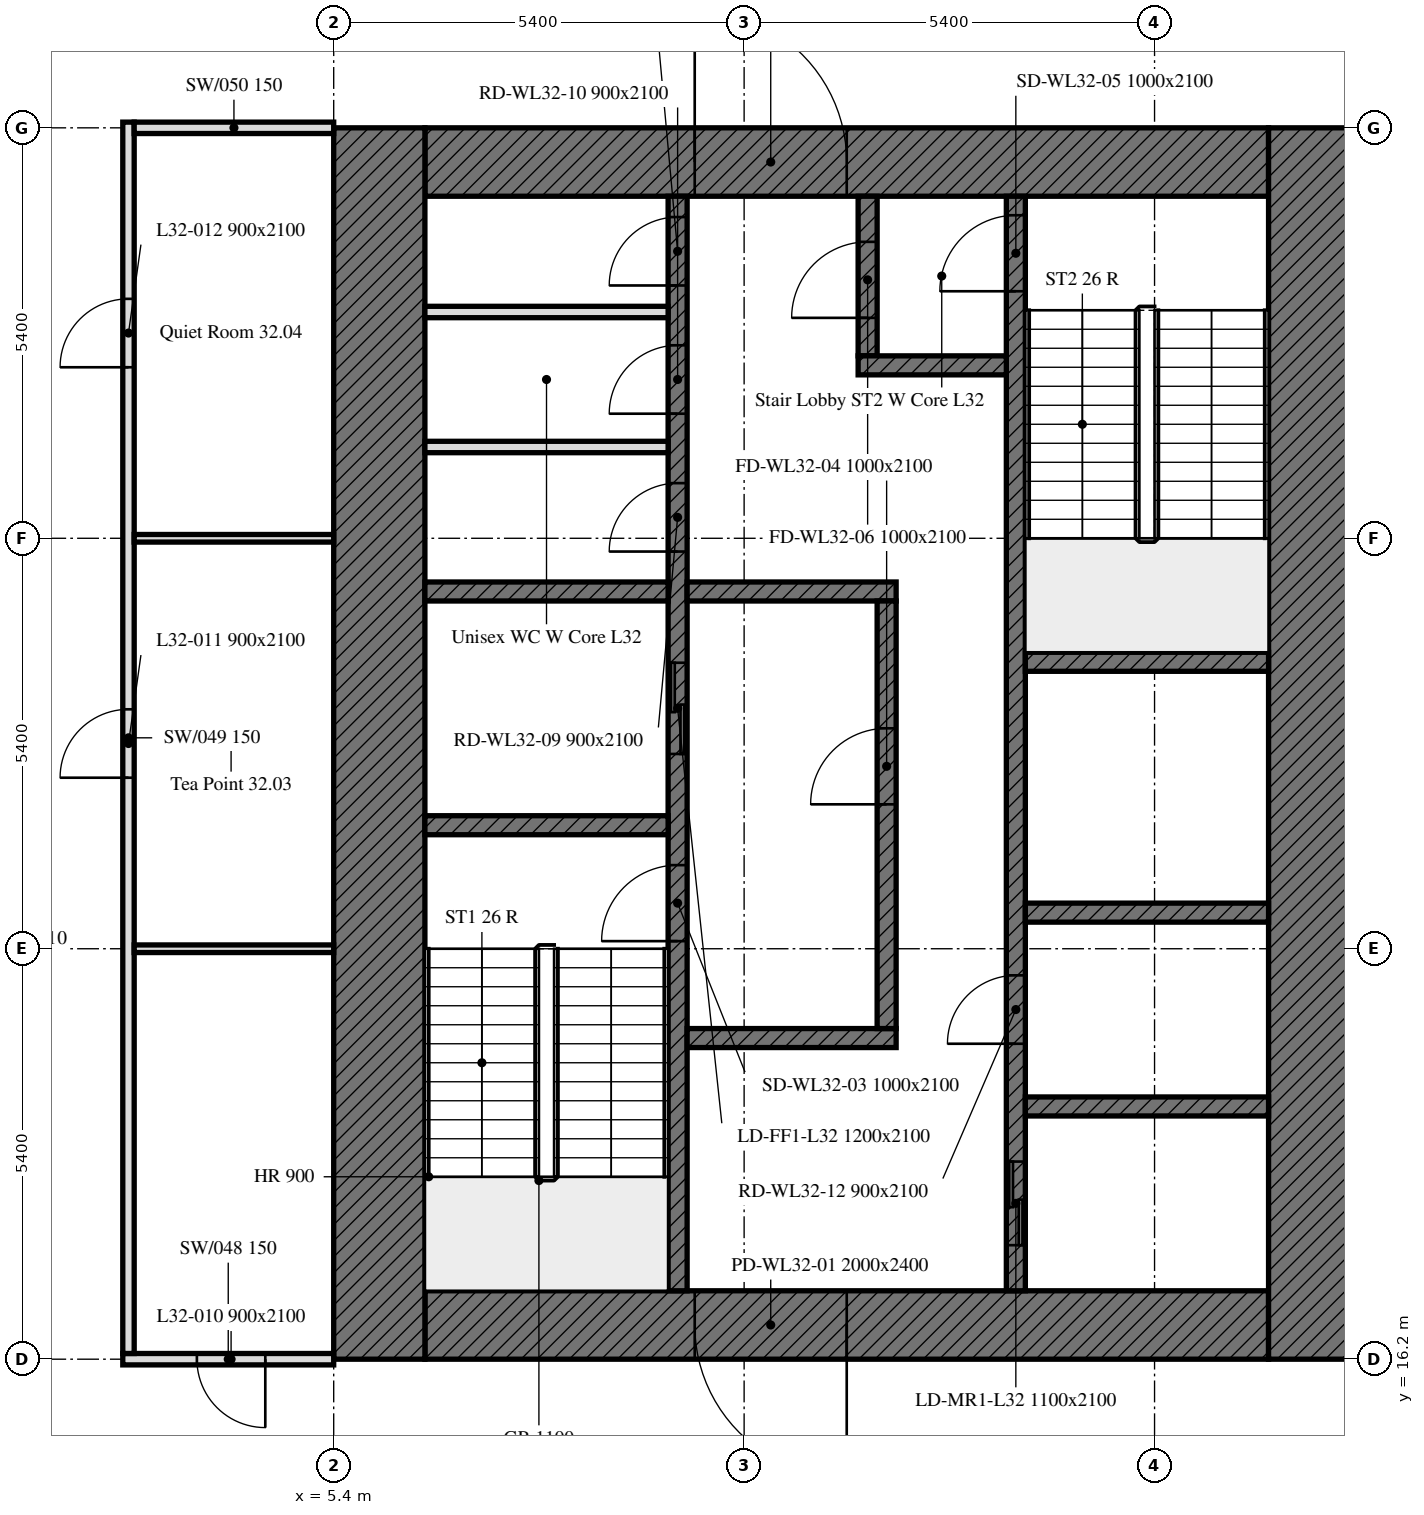
"""IFC4 building model, lengths in metres.
Left out: names, types, materials, properties, quantities, classifications, styles, units other than length and angle.
Written with IfcOpenShell. Run it as: python <this file> out.ifc"""

import sys

from ifc_helpers import new_model, si_unit, direction, frame, frame_2d, origin, place, context, subcontext, project, spatial, rectangle, extrude, element, fill, save


model = new_model("IFC4")
c1 = context("Model", 3, precision=1e-05, world=origin(), true_north=direction((0.0, 1.0)))
c2 = subcontext(c1, "Body", "Model", "MODEL_VIEW")
j1 = project(units=[si_unit("LENGTHUNIT", "METRE"), si_unit("PLANEANGLEUNIT", "RADIAN")], contexts=[c1])
p1 = place(None, origin())
s1 = spatial("IfcSite", under=j1, at=p1, CompositionType="ELEMENT")
p2 = place(p1, origin())
s2 = spatial("IfcBuilding", under=s1, at=p2, CompositionType="ELEMENT")
p3 = place(p2, frame((0.0, 0.0, 138.4)))
s3 = spatial("IfcBuildingStorey", under=s2, at=p3, CompositionType="ELEMENT", Elevation=138.4)
p4 = place(p3, frame((17.7, 16.65, 0.0), z_axis=(0.0, 0.0, 1.0), x_axis=(-1.0, 0.0, 0.0)))
e1 = element("IfcWall", 1, at=p4, inside=s3, PredefinedType="SOLIDWALL", context=c2, shape_type="SweptSolid", body=[
    extrude(rectangle(XDim=11.1, YDim=0.9, at=frame_2d((5.55, 0.0))), origin(), (0.0, 0.0, 1.0), 4.5),
])
p5 = place(p4, frame((5.55, 0.0, 0.0)))
e2 = element("IfcOpeningElement", 2, at=p5, cuts=e1, PredefinedType="OPENING", context=c2, shape_type="SweptSolid", body=[
    extrude(rectangle(XDim=2.0, YDim=2.4, at=frame_2d((1.0, 1.2))), frame((0.0, 0.45, 0.0), z_axis=(0.0, -1.0, 0.0), x_axis=(1.0, 0.0, 0.0)), (0.0, 0.0, 1.0), 0.9),
])
p6 = place(p3, frame((6.6, 31.95, 0.0), z_axis=(0.0, 0.0, 1.0), x_axis=(1.0, 0.0, 0.0)))
e3 = element("IfcWall", 3, at=p6, inside=s3, PredefinedType="SOLIDWALL", context=c2, shape_type="SweptSolid", body=[
    extrude(rectangle(XDim=11.1, YDim=0.9, at=frame_2d((5.55, 0.0))), origin(), (0.0, 0.0, 1.0), 4.5),
])
p7 = place(p6, frame((3.55, 0.0, 0.0)))
e4 = element("IfcOpeningElement", 4, at=p7, cuts=e3, PredefinedType="OPENING", context=c2, shape_type="SweptSolid", body=[
    extrude(rectangle(XDim=2.0, YDim=2.4, at=frame_2d((1.0, 1.2))), frame((0.0, 0.45, 0.0), z_axis=(0.0, -1.0, 0.0), x_axis=(1.0, 0.0, 0.0)), (0.0, 0.0, 1.0), 0.9),
])
for number, where, z_axis, x_axis in (
    (5, (6.0, 16.2, 0.0), (0.0, 0.0, 1.0), (0.0, 1.0, 0.0)),
    (6, (18.3, 32.4, 0.0), (0.0, 0.0, 1.0), (0.0, -1.0, 0.0)),
):
    element("IfcWall", number, at=place(p3, frame(where, z_axis=z_axis, x_axis=x_axis)), inside=s3, PredefinedType="SOLIDWALL", context=c2, shape_type="SweptSolid", body=[
        extrude(rectangle(XDim=16.2, YDim=1.2, at=frame_2d((8.1, 0.0))), origin(), (0.0, 0.0, 1.0), 4.5),
    ])
p8 = place(p3, frame((9.925, 17.1, 0.0), z_axis=(0.0, 0.0, 1.0), x_axis=(0.0, 1.0, 0.0)))
e7 = element("IfcWall", 7, at=p8, inside=s3, PredefinedType="SOLIDWALL", context=c2, shape_type="SweptSolid", body=[
    extrude(rectangle(XDim=14.4, YDim=0.25, at=frame_2d((7.2, 0.0))), origin(), (0.0, 0.0, 1.0), 4.5),
])
p9 = place(p8, frame((4.6, 0.0, 0.0)))
e8 = element("IfcOpeningElement", 8, at=p9, cuts=e7, PredefinedType="OPENING", context=c2, shape_type="SweptSolid", body=[
    extrude(rectangle(XDim=1.0, YDim=2.1, at=frame_2d((0.5, 1.05))), frame((0.0, 0.125, 0.0), z_axis=(0.0, -1.0, 0.0), x_axis=(1.0, 0.0, 0.0)), (0.0, 0.0, 1.0), 0.25),
])
p10 = place(p8, frame((7.062, 0.0, 0.0)))
e9 = element("IfcOpeningElement", 9, at=p10, cuts=e7, PredefinedType="OPENING", context=c2, shape_type="SweptSolid", body=[
    extrude(rectangle(XDim=1.2, YDim=2.1, at=frame_2d((0.6, 1.05))), frame((0.0, 0.125, 0.0), z_axis=(0.0, -1.0, 0.0), x_axis=(1.0, 0.0, 0.0)), (0.0, 0.0, 1.0), 0.25),
])
p11 = place(p8, frame((9.726, 0.0, 0.0)))
e10 = element("IfcOpeningElement", 10, at=p11, cuts=e7, PredefinedType="OPENING", context=c2, shape_type="SweptSolid", body=[
    extrude(rectangle(XDim=0.9, YDim=2.1, at=frame_2d((0.45, 1.05))), frame((0.0, 0.125, 0.0), z_axis=(0.0, -1.0, 0.0), x_axis=(1.0, 0.0, 0.0)), (0.0, 0.0, 1.0), 0.25),
])
p12 = place(p8, frame((11.539, 0.0, 0.0)))
e11 = element("IfcOpeningElement", 11, at=p12, cuts=e7, PredefinedType="OPENING", context=c2, shape_type="SweptSolid", body=[
    extrude(rectangle(XDim=0.9, YDim=2.1, at=frame_2d((0.45, 1.05))), frame((0.0, 0.125, 0.0), z_axis=(0.0, -1.0, 0.0), x_axis=(1.0, 0.0, 0.0)), (0.0, 0.0, 1.0), 0.25),
])
p13 = place(p8, frame((13.226, 0.0, 0.0)))
e12 = element("IfcOpeningElement", 12, at=p13, cuts=e7, PredefinedType="OPENING", context=c2, shape_type="SweptSolid", body=[
    extrude(rectangle(XDim=0.9, YDim=2.1, at=frame_2d((0.45, 1.05))), frame((0.0, 0.125, 0.0), z_axis=(0.0, -1.0, 0.0), x_axis=(1.0, 0.0, 0.0)), (0.0, 0.0, 1.0), 0.25),
])
p14 = place(p3, frame((14.375, 17.1, 0.0), z_axis=(0.0, 0.0, 1.0), x_axis=(0.0, 1.0, 0.0)))
e13 = element("IfcWall", 13, at=p14, inside=s3, PredefinedType="SOLIDWALL", context=c2, shape_type="SweptSolid", body=[
    extrude(rectangle(XDim=14.4, YDim=0.25, at=frame_2d((7.2, 0.0))), origin(), (0.0, 0.0, 1.0), 4.5),
])
p15 = place(p14, frame((13.15, 0.0, 0.0)))
e14 = element("IfcOpeningElement", 14, at=p15, cuts=e13, PredefinedType="OPENING", context=c2, shape_type="SweptSolid", body=[
    extrude(rectangle(XDim=1.0, YDim=2.1, at=frame_2d((0.5, 1.05))), frame((0.0, 0.125, 0.0), z_axis=(0.0, -1.0, 0.0), x_axis=(1.0, 0.0, 0.0)), (0.0, 0.0, 1.0), 0.25),
])
p16 = place(p14, frame((0.6, 0.0, 0.0)))
e15 = element("IfcOpeningElement", 15, at=p16, cuts=e13, PredefinedType="OPENING", context=c2, shape_type="SweptSolid", body=[
    extrude(rectangle(XDim=1.1, YDim=2.1, at=frame_2d((0.55, 1.05))), frame((0.0, 0.125, 0.0), z_axis=(0.0, -1.0, 0.0), x_axis=(1.0, 0.0, 0.0)), (0.0, 0.0, 1.0), 0.25),
])
p17 = place(p14, frame((3.25, 0.0, 0.0)))
e16 = element("IfcOpeningElement", 16, at=p17, cuts=e13, PredefinedType="OPENING", context=c2, shape_type="SweptSolid", body=[
    extrude(rectangle(XDim=0.9, YDim=2.1, at=frame_2d((0.45, 1.05))), frame((0.0, 0.125, 0.0), z_axis=(0.0, -1.0, 0.0), x_axis=(1.0, 0.0, 0.0)), (0.0, 0.0, 1.0), 0.25),
])
for number, where, z_axis, x_axis in (
    (17, (6.6, 23.225, 0.0), (0.0, 0.0, 1.0), (1.0, 0.0, 0.0)),
    (18, (14.5, 25.375, 0.0), (0.0, 0.0, 1.0), (1.0, 0.0, 0.0)),
    (19, (14.5, 22.075, 0.0), (0.0, 0.0, 1.0), (1.0, 0.0, 0.0)),
    (20, (6.6, 26.3, 0.0), (0.0, 0.0, 1.0), (1.0, 0.0, 0.0)),
):
    element("IfcWall", number, at=place(p3, frame(where, z_axis=z_axis, x_axis=x_axis)), inside=s3, PredefinedType="SOLIDWALL", context=c2, shape_type="SweptSolid", body=[
        extrude(rectangle(XDim=3.2, YDim=0.25, at=frame_2d((1.6, 0.0))), origin(), (0.0, 0.0, 1.0), 4.5),
    ])
for number, where, z_axis, x_axis in (
    (21, (10.05, 26.3, 0.0), (0.0, 0.0, 1.0), (1.0, 0.0, 0.0)),
    (22, (10.05, 20.425, 0.0), (0.0, 0.0, 1.0), (1.0, 0.0, 0.0)),
):
    element("IfcWall", number, at=place(p3, frame(where, z_axis=z_axis, x_axis=x_axis)), inside=s3, PredefinedType="SOLIDWALL", context=c2, shape_type="SweptSolid", body=[
        extrude(rectangle(XDim=2.75, YDim=0.25, at=frame_2d((1.375, 0.0))), origin(), (0.0, 0.0, 1.0), 4.5),
    ])
p18 = place(p3, frame((12.425, 29.4, 0.0), z_axis=(0.0, 0.0, 1.0), x_axis=(0.0, 1.0, 0.0)))
e23 = element("IfcWall", 23, at=p18, inside=s3, PredefinedType="SOLIDWALL", context=c2, shape_type="SweptSolid", body=[
    extrude(rectangle(XDim=2.1, YDim=0.25, at=frame_2d((1.05, 0.0))), origin(), (0.0, 0.0, 1.0), 4.5),
])
p19 = place(p18, frame((0.5, 0.0, 0.0)))
e24 = element("IfcOpeningElement", 24, at=p19, cuts=e23, PredefinedType="OPENING", context=c2, shape_type="SweptSolid", body=[
    extrude(rectangle(XDim=1.0, YDim=2.1, at=frame_2d((0.5, 1.05))), frame((0.0, 0.125, 0.0), z_axis=(0.0, -1.0, 0.0), x_axis=(1.0, 0.0, 0.0)), (0.0, 0.0, 1.0), 0.25),
])
p20 = place(p3, frame((12.3, 29.275, 0.0), z_axis=(0.0, 0.0, 1.0), x_axis=(1.0, 0.0, 0.0)))
e25 = element("IfcWall", 25, at=p20, inside=s3, PredefinedType="SOLIDWALL", context=c2, shape_type="SweptSolid", body=[
    extrude(rectangle(XDim=1.95, YDim=0.25, at=frame_2d((0.975, 0.0))), origin(), (0.0, 0.0, 1.0), 4.5),
])
p21 = place(p3, frame((12.675, 20.55, 0.0), z_axis=(0.0, 0.0, 1.0), x_axis=(0.0, 1.0, 0.0)))
e26 = element("IfcWall", 26, at=p21, inside=s3, PredefinedType="SOLIDWALL", context=c2, shape_type="SweptSolid", body=[
    extrude(rectangle(XDim=5.625, YDim=0.25, at=frame_2d((2.812, 0.0))), origin(), (0.0, 0.0, 1.0), 4.5),
])
p22 = place(p21, frame((2.95, 0.0, 0.0)))
e27 = element("IfcOpeningElement", 27, at=p22, cuts=e26, PredefinedType="OPENING", context=c2, shape_type="SweptSolid", body=[
    extrude(rectangle(XDim=1.0, YDim=2.1, at=frame_2d((0.5, 1.05))), frame((0.0, 0.125, 0.0), z_axis=(0.0, -1.0, 0.0), x_axis=(1.0, 0.0, 0.0)), (0.0, 0.0, 1.0), 0.25),
])
p23 = place(p3, frame((14.5, 19.525, 0.0), z_axis=(0.0, 0.0, 1.0), x_axis=(1.0, 0.0, 0.0)))
e28 = element("IfcWall", 28, at=p23, inside=s3, PredefinedType="SOLIDWALL", context=c2, shape_type="SweptSolid", body=[
    extrude(rectangle(XDim=3.2, YDim=0.25, at=frame_2d((1.6, 0.0))), origin(), (0.0, 0.0, 1.0), 4.5),
])
for number, where, z_axis, x_axis in (
    (29, (6.6, 28.201, 0.0), (0.0, 0.0, 1.0), (1.0, 0.0, 0.0)),
    (30, (6.6, 29.977, 0.0), (0.0, 0.0, 1.0), (1.0, 0.0, 0.0)),
):
    element("IfcWall", number, at=place(p3, frame(where, z_axis=z_axis, x_axis=x_axis)), inside=s3, PredefinedType="PARTITIONING", context=c2, shape_type="SweptSolid", body=[
        extrude(rectangle(XDim=3.2, YDim=0.15, at=frame_2d((1.6, 0.0))), origin(), (0.0, 0.0, 1.0), 4.5),
    ])
p24 = place(p3, frame((5.4, 16.2, 0.0), z_axis=(0.0, 0.0, 1.0), x_axis=(-1.0, 0.0, 0.0)))
e31 = element("IfcWall", 31, at=p24, inside=s3, PredefinedType="PARTITIONING", context=c2, shape_type="SweptSolid", body=[
    extrude(rectangle(XDim=2.775, YDim=0.15, at=frame_2d((1.387, 0.0))), origin(), (0.0, 0.0, 1.0), 3.75),
])
p25 = place(p24, frame((0.9, 0.0, 0.0)))
e32 = element("IfcOpeningElement", 32, at=p25, cuts=e31, PredefinedType="OPENING", context=c2, shape_type="SweptSolid", body=[
    extrude(rectangle(XDim=0.9, YDim=2.1, at=frame_2d((0.45, 1.05))), frame((0.0, 0.075, 0.0), z_axis=(0.0, -1.0, 0.0), x_axis=(1.0, 0.0, 0.0)), (0.0, 0.0, 1.0), 0.15),
])
p26 = place(p3, frame((2.7, 16.275, 0.0), z_axis=(0.0, 0.0, 1.0), x_axis=(0.0, 1.0, 0.0)))
e33 = element("IfcWall", 33, at=p26, inside=s3, PredefinedType="PARTITIONING", context=c2, shape_type="SweptSolid", body=[
    extrude(rectangle(XDim=16.2, YDim=0.15, at=frame_2d((8.1, 0.0))), origin(), (0.0, 0.0, 1.0), 3.75),
])
p27 = place(p26, frame((7.575, 0.0, 0.0)))
e34 = element("IfcOpeningElement", 34, at=p27, cuts=e33, PredefinedType="OPENING", context=c2, shape_type="SweptSolid", body=[
    extrude(rectangle(XDim=0.9, YDim=2.1, at=frame_2d((0.45, 1.05))), frame((0.0, 0.075, 0.0), z_axis=(0.0, -1.0, 0.0), x_axis=(1.0, 0.0, 0.0)), (0.0, 0.0, 1.0), 0.15),
])
p28 = place(p26, frame((12.975, 0.0, 0.0)))
e35 = element("IfcOpeningElement", 35, at=p28, cuts=e33, PredefinedType="OPENING", context=c2, shape_type="SweptSolid", body=[
    extrude(rectangle(XDim=0.9, YDim=2.1, at=frame_2d((0.45, 1.05))), frame((0.0, 0.075, 0.0), z_axis=(0.0, -1.0, 0.0), x_axis=(1.0, 0.0, 0.0)), (0.0, 0.0, 1.0), 0.15),
])
p29 = place(p3, frame((2.775, 32.4, 0.0), z_axis=(0.0, 0.0, 1.0), x_axis=(1.0, 0.0, 0.0)))
e36 = element("IfcWall", 36, at=p29, inside=s3, PredefinedType="PARTITIONING", context=c2, shape_type="SweptSolid", body=[
    extrude(rectangle(XDim=2.625, YDim=0.15, at=frame_2d((1.312, 0.0))), origin(), (0.0, 0.0, 1.0), 3.75),
])
for number, where, z_axis, x_axis in (
    (37, (5.4, 21.6, 0.0), (0.0, 0.0, 1.0), (-1.0, 0.0, 0.0)),
    (38, (5.4, 27.0, 0.0), (0.0, 0.0, 1.0), (-1.0, 0.0, 0.0)),
):
    element("IfcWall", number, at=place(p3, frame(where, z_axis=z_axis, x_axis=x_axis)), inside=s3, PredefinedType="PARTITIONING", context=c2, shape_type="SweptSolid", body=[
        extrude(rectangle(XDim=2.625, YDim=0.1, at=frame_2d((1.312, 0.0))), origin(), (0.0, 0.0, 1.0), 3.75),
    ])
p30 = place(p5, origin())
e39 = element("IfcDoor", 39, at=p30, inside=s3, OperationType="DOUBLE_DOOR_SINGLE_SWING", PredefinedType="DOOR", context=c2, shape_type="SweptSolid", body=[
    extrude(rectangle(XDim=2.0, YDim=2.4, at=frame_2d((1.0, 1.2))), frame((0.0, 0.025, 0.0), z_axis=(0.0, -1.0, 0.0), x_axis=(1.0, 0.0, 0.0)), (0.0, 0.0, 1.0), 0.05),
])
fill(e2, e39)
p31 = place(p7, origin())
e40 = element("IfcDoor", 40, at=p31, inside=s3, OperationType="DOUBLE_DOOR_SINGLE_SWING", PredefinedType="DOOR", context=c2, shape_type="SweptSolid", body=[
    extrude(rectangle(XDim=2.0, YDim=2.4, at=frame_2d((1.0, 1.2))), frame((0.0, 0.025, 0.0), z_axis=(0.0, -1.0, 0.0), x_axis=(1.0, 0.0, 0.0)), (0.0, 0.0, 1.0), 0.05),
])
fill(e4, e40)
p32 = place(p9, origin())
e41 = element("IfcDoor", 41, at=p32, inside=s3, OperationType="SINGLE_SWING_LEFT", PredefinedType="DOOR", context=c2, shape_type="SweptSolid", body=[
    extrude(rectangle(XDim=1.0, YDim=2.1, at=frame_2d((0.5, 1.05))), frame((0.0, 0.025, 0.0), z_axis=(0.0, -1.0, 0.0), x_axis=(1.0, 0.0, 0.0)), (0.0, 0.0, 1.0), 0.05),
])
fill(e8, e41)
p33 = place(p22, origin())
e42 = element("IfcDoor", 42, at=p33, inside=s3, OperationType="SINGLE_SWING_LEFT", PredefinedType="DOOR", context=c2, shape_type="SweptSolid", body=[
    extrude(rectangle(XDim=1.0, YDim=2.1, at=frame_2d((0.5, 1.05))), frame((0.0, 0.025, 0.0), z_axis=(0.0, -1.0, 0.0), x_axis=(1.0, 0.0, 0.0)), (0.0, 0.0, 1.0), 0.05),
])
fill(e27, e42)
p34 = place(p15, origin())
e43 = element("IfcDoor", 43, at=p34, inside=s3, OperationType="SINGLE_SWING_LEFT", PredefinedType="DOOR", context=c2, shape_type="SweptSolid", body=[
    extrude(rectangle(XDim=1.0, YDim=2.1, at=frame_2d((0.5, 1.05))), frame((0.0, 0.025, 0.0), z_axis=(0.0, -1.0, 0.0), x_axis=(1.0, 0.0, 0.0)), (0.0, 0.0, 1.0), 0.05),
])
fill(e14, e43)
p35 = place(p19, origin())
e44 = element("IfcDoor", 44, at=p35, inside=s3, OperationType="SINGLE_SWING_LEFT", PredefinedType="DOOR", context=c2, shape_type="SweptSolid", body=[
    extrude(rectangle(XDim=1.0, YDim=2.1, at=frame_2d((0.5, 1.05))), frame((0.0, 0.025, 0.0), z_axis=(0.0, -1.0, 0.0), x_axis=(1.0, 0.0, 0.0)), (0.0, 0.0, 1.0), 0.05),
])
fill(e24, e44)
p36 = place(p10, origin())
e45 = element("IfcDoor", 45, at=p36, inside=s3, OperationType="DOUBLE_DOOR_SLIDING", PredefinedType="DOOR", context=c2, shape_type="SweptSolid", body=[
    extrude(rectangle(XDim=1.2, YDim=2.1, at=frame_2d((0.6, 1.05))), frame((0.0, 0.025, 0.0), z_axis=(0.0, -1.0, 0.0), x_axis=(1.0, 0.0, 0.0)), (0.0, 0.0, 1.0), 0.05),
])
fill(e9, e45)
p37 = place(p16, origin())
e46 = element("IfcDoor", 46, at=p37, inside=s3, OperationType="DOUBLE_DOOR_SLIDING", PredefinedType="DOOR", context=c2, shape_type="SweptSolid", body=[
    extrude(rectangle(XDim=1.1, YDim=2.1, at=frame_2d((0.55, 1.05))), frame((0.0, 0.025, 0.0), z_axis=(0.0, -1.0, 0.0), x_axis=(1.0, 0.0, 0.0)), (0.0, 0.0, 1.0), 0.05),
])
fill(e15, e46)
p38 = place(p11, origin())
e47 = element("IfcDoor", 47, at=p38, inside=s3, OperationType="SINGLE_SWING_LEFT", PredefinedType="DOOR", context=c2, shape_type="SweptSolid", body=[
    extrude(rectangle(XDim=0.9, YDim=2.1, at=frame_2d((0.45, 1.05))), frame((0.0, 0.025, 0.0), z_axis=(0.0, -1.0, 0.0), x_axis=(1.0, 0.0, 0.0)), (0.0, 0.0, 1.0), 0.05),
])
fill(e10, e47)
p39 = place(p12, origin())
e48 = element("IfcDoor", 48, at=p39, inside=s3, OperationType="SINGLE_SWING_LEFT", PredefinedType="DOOR", context=c2, shape_type="SweptSolid", body=[
    extrude(rectangle(XDim=0.9, YDim=2.1, at=frame_2d((0.45, 1.05))), frame((0.0, 0.025, 0.0), z_axis=(0.0, -1.0, 0.0), x_axis=(1.0, 0.0, 0.0)), (0.0, 0.0, 1.0), 0.05),
])
fill(e11, e48)
p40 = place(p13, origin())
e49 = element("IfcDoor", 49, at=p40, inside=s3, OperationType="SINGLE_SWING_LEFT", PredefinedType="DOOR", context=c2, shape_type="SweptSolid", body=[
    extrude(rectangle(XDim=0.9, YDim=2.1, at=frame_2d((0.45, 1.05))), frame((0.0, 0.025, 0.0), z_axis=(0.0, -1.0, 0.0), x_axis=(1.0, 0.0, 0.0)), (0.0, 0.0, 1.0), 0.05),
])
fill(e12, e49)
p41 = place(p17, origin())
e50 = element("IfcDoor", 50, at=p41, inside=s3, OperationType="SINGLE_SWING_LEFT", PredefinedType="DOOR", context=c2, shape_type="SweptSolid", body=[
    extrude(rectangle(XDim=0.9, YDim=2.1, at=frame_2d((0.45, 1.05))), frame((0.0, 0.025, 0.0), z_axis=(0.0, -1.0, 0.0), x_axis=(1.0, 0.0, 0.0)), (0.0, 0.0, 1.0), 0.05),
])
fill(e16, e50)
p42 = place(p25, origin())
e51 = element("IfcDoor", 51, at=p42, inside=s3, OperationType="SINGLE_SWING_LEFT", PredefinedType="DOOR", context=c2, shape_type="SweptSolid", body=[
    extrude(rectangle(XDim=0.9, YDim=2.1, at=frame_2d((0.45, 1.05))), frame((0.0, 0.025, 0.0), z_axis=(0.0, -1.0, 0.0), x_axis=(1.0, 0.0, 0.0)), (0.0, 0.0, 1.0), 0.05),
])
fill(e32, e51)
p43 = place(p27, origin())
e52 = element("IfcDoor", 52, at=p43, inside=s3, OperationType="SINGLE_SWING_LEFT", PredefinedType="DOOR", context=c2, shape_type="SweptSolid", body=[
    extrude(rectangle(XDim=0.9, YDim=2.1, at=frame_2d((0.45, 1.05))), frame((0.0, 0.025, 0.0), z_axis=(0.0, -1.0, 0.0), x_axis=(1.0, 0.0, 0.0)), (0.0, 0.0, 1.0), 0.05),
])
fill(e34, e52)
p44 = place(p28, origin())
e53 = element("IfcDoor", 53, at=p44, inside=s3, OperationType="SINGLE_SWING_LEFT", PredefinedType="DOOR", context=c2, shape_type="SweptSolid", body=[
    extrude(rectangle(XDim=0.9, YDim=2.1, at=frame_2d((0.45, 1.05))), frame((0.0, 0.025, 0.0), z_axis=(0.0, -1.0, 0.0), x_axis=(1.0, 0.0, 0.0)), (0.0, 0.0, 1.0), 0.05),
])
fill(e35, e53)
save(model, sys.argv[1])
